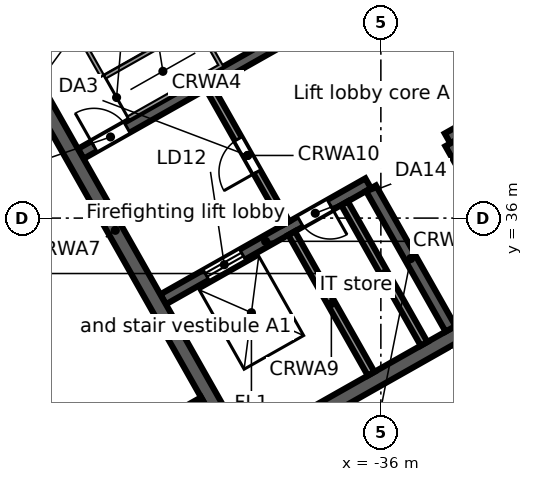
"""IFC4 building model, lengths in metres.
Left out: names, types, materials, properties, quantities, classifications, styles, units other than length and angle.
Written with IfcOpenShell. Run it as: python <this file> out.ifc"""

import sys

from ifc_helpers import new_model, si_unit, direction, frame, frame_2d, origin, place, context, subcontext, project, spatial, rectangle, extrude, element, fill, save


model = new_model("IFC4")
c1 = context("Model", 3, precision=1e-05, world=origin(), true_north=direction((0.0, 1.0)))
c2 = subcontext(c1, "Body", "Model", "MODEL_VIEW")
j1 = project(units=[si_unit("LENGTHUNIT", "METRE"), si_unit("PLANEANGLEUNIT", "RADIAN")], contexts=[c1])
p1 = place(None, origin())
s1 = spatial("IfcSite", under=j1, at=p1, CompositionType="ELEMENT")
p2 = place(p1, origin())
s2 = spatial("IfcBuilding", under=s1, at=p2, CompositionType="ELEMENT")
p3 = place(p2, frame((0.0, 0.0, 281.7)))
s3 = spatial("IfcBuildingStorey", under=s2, at=p3, CompositionType="ELEMENT", Elevation=281.7)
p4 = place(p3, frame((-58.732, 38.771, 0.0), z_axis=(0.0, 0.0, 1.0), x_axis=(0.870355615581, 0.492423702137, 0.0)))
e1 = element("IfcWall", 1, at=p4, inside=s3, PredefinedType="STANDARD", context=c2, shape_type="SweptSolid", body=[
    extrude(rectangle(XDim=64.052, YDim=0.25, at=frame_2d((32.026, 0.0))), origin(), (0.0, 0.0, 1.0), 3.45),
])
p5 = place(p4, frame((61.259, 0.0, 0.8)))
e2 = element("IfcOpeningElement", 2, at=p5, cuts=e1, PredefinedType="OPENING", context=c2, shape_type="SweptSolid", body=[
    extrude(rectangle(XDim=2.4, YDim=2.2, at=frame_2d((1.2, 1.1))), frame((0.0, 0.135, 0.0), z_axis=(0.0, -1.0, 0.0), x_axis=(1.0, 0.0, 0.0)), (0.0, 0.0, 1.0), 0.27),
])
p6 = place(p4, frame((58.216, 0.0, 0.8)))
e3 = element("IfcOpeningElement", 3, at=p6, cuts=e1, PredefinedType="OPENING", context=c2, shape_type="SweptSolid", body=[
    extrude(rectangle(XDim=2.4, YDim=2.2, at=frame_2d((1.2, 1.1))), frame((0.0, 0.135, 0.0), z_axis=(0.0, -1.0, 0.0), x_axis=(1.0, 0.0, 0.0)), (0.0, 0.0, 1.0), 0.27),
])
p7 = place(p4, frame((55.173, 0.0, 0.8)))
e4 = element("IfcOpeningElement", 4, at=p7, cuts=e1, PredefinedType="OPENING", context=c2, shape_type="SweptSolid", body=[
    extrude(rectangle(XDim=2.4, YDim=2.2, at=frame_2d((1.2, 1.1))), frame((0.0, 0.135, 0.0), z_axis=(0.0, -1.0, 0.0), x_axis=(1.0, 0.0, 0.0)), (0.0, 0.0, 1.0), 0.27),
])
p8 = place(p4, frame((52.129, 0.0, 0.8)))
e5 = element("IfcOpeningElement", 5, at=p8, cuts=e1, PredefinedType="OPENING", context=c2, shape_type="SweptSolid", body=[
    extrude(rectangle(XDim=2.4, YDim=2.2, at=frame_2d((1.2, 1.1))), frame((0.0, 0.135, 0.0), z_axis=(0.0, -1.0, 0.0), x_axis=(1.0, 0.0, 0.0)), (0.0, 0.0, 1.0), 0.27),
])
p9 = place(p4, frame((49.086, 0.0, 0.8)))
e6 = element("IfcOpeningElement", 6, at=p9, cuts=e1, PredefinedType="OPENING", context=c2, shape_type="SweptSolid", body=[
    extrude(rectangle(XDim=2.4, YDim=2.2, at=frame_2d((1.2, 1.1))), frame((0.0, 0.135, 0.0), z_axis=(0.0, -1.0, 0.0), x_axis=(1.0, 0.0, 0.0)), (0.0, 0.0, 1.0), 0.27),
])
p10 = place(p4, frame((46.043, 0.0, 0.8)))
e7 = element("IfcOpeningElement", 7, at=p10, cuts=e1, PredefinedType="OPENING", context=c2, shape_type="SweptSolid", body=[
    extrude(rectangle(XDim=2.4, YDim=2.2, at=frame_2d((1.2, 1.1))), frame((0.0, 0.135, 0.0), z_axis=(0.0, -1.0, 0.0), x_axis=(1.0, 0.0, 0.0)), (0.0, 0.0, 1.0), 0.27),
])
p11 = place(p4, frame((43.0, 0.0, 0.8)))
e8 = element("IfcOpeningElement", 8, at=p11, cuts=e1, PredefinedType="OPENING", context=c2, shape_type="SweptSolid", body=[
    extrude(rectangle(XDim=2.4, YDim=2.2, at=frame_2d((1.2, 1.1))), frame((0.0, 0.135, 0.0), z_axis=(0.0, -1.0, 0.0), x_axis=(1.0, 0.0, 0.0)), (0.0, 0.0, 1.0), 0.27),
])
p12 = place(p4, frame((39.956, 0.0, 0.8)))
e9 = element("IfcOpeningElement", 9, at=p12, cuts=e1, PredefinedType="OPENING", context=c2, shape_type="SweptSolid", body=[
    extrude(rectangle(XDim=2.4, YDim=2.2, at=frame_2d((1.2, 1.1))), frame((0.0, 0.135, 0.0), z_axis=(0.0, -1.0, 0.0), x_axis=(1.0, 0.0, 0.0)), (0.0, 0.0, 1.0), 0.27),
])
p13 = place(p4, frame((36.913, 0.0, 0.8)))
e10 = element("IfcOpeningElement", 10, at=p13, cuts=e1, PredefinedType="OPENING", context=c2, shape_type="SweptSolid", body=[
    extrude(rectangle(XDim=2.4, YDim=2.2, at=frame_2d((1.2, 1.1))), frame((0.0, 0.135, 0.0), z_axis=(0.0, -1.0, 0.0), x_axis=(1.0, 0.0, 0.0)), (0.0, 0.0, 1.0), 0.27),
])
p14 = place(p4, frame((33.87, 0.0, 0.8)))
e11 = element("IfcOpeningElement", 11, at=p14, cuts=e1, PredefinedType="OPENING", context=c2, shape_type="SweptSolid", body=[
    extrude(rectangle(XDim=2.4, YDim=2.2, at=frame_2d((1.2, 1.1))), frame((0.0, 0.135, 0.0), z_axis=(0.0, -1.0, 0.0), x_axis=(1.0, 0.0, 0.0)), (0.0, 0.0, 1.0), 0.27),
])
p15 = place(p4, frame((30.826, 0.0, 0.8)))
e12 = element("IfcOpeningElement", 12, at=p15, cuts=e1, PredefinedType="OPENING", context=c2, shape_type="SweptSolid", body=[
    extrude(rectangle(XDim=2.4, YDim=2.2, at=frame_2d((1.2, 1.1))), frame((0.0, 0.135, 0.0), z_axis=(0.0, -1.0, 0.0), x_axis=(1.0, 0.0, 0.0)), (0.0, 0.0, 1.0), 0.27),
])
p16 = place(p4, frame((27.783, 0.0, 0.8)))
e13 = element("IfcOpeningElement", 13, at=p16, cuts=e1, PredefinedType="OPENING", context=c2, shape_type="SweptSolid", body=[
    extrude(rectangle(XDim=2.4, YDim=2.2, at=frame_2d((1.2, 1.1))), frame((0.0, 0.135, 0.0), z_axis=(0.0, -1.0, 0.0), x_axis=(1.0, 0.0, 0.0)), (0.0, 0.0, 1.0), 0.27),
])
p17 = place(p4, frame((24.74, 0.0, 0.8)))
e14 = element("IfcOpeningElement", 14, at=p17, cuts=e1, PredefinedType="OPENING", context=c2, shape_type="SweptSolid", body=[
    extrude(rectangle(XDim=2.4, YDim=2.2, at=frame_2d((1.2, 1.1))), frame((0.0, 0.135, 0.0), z_axis=(0.0, -1.0, 0.0), x_axis=(1.0, 0.0, 0.0)), (0.0, 0.0, 1.0), 0.27),
])
p18 = place(p4, frame((21.696, 0.0, 0.8)))
e15 = element("IfcOpeningElement", 15, at=p18, cuts=e1, PredefinedType="OPENING", context=c2, shape_type="SweptSolid", body=[
    extrude(rectangle(XDim=2.4, YDim=2.2, at=frame_2d((1.2, 1.1))), frame((0.0, 0.135, 0.0), z_axis=(0.0, -1.0, 0.0), x_axis=(1.0, 0.0, 0.0)), (0.0, 0.0, 1.0), 0.27),
])
p19 = place(p4, frame((18.653, 0.0, 0.8)))
e16 = element("IfcOpeningElement", 16, at=p19, cuts=e1, PredefinedType="OPENING", context=c2, shape_type="SweptSolid", body=[
    extrude(rectangle(XDim=2.4, YDim=2.2, at=frame_2d((1.2, 1.1))), frame((0.0, 0.135, 0.0), z_axis=(0.0, -1.0, 0.0), x_axis=(1.0, 0.0, 0.0)), (0.0, 0.0, 1.0), 0.27),
])
p20 = place(p4, frame((15.61, 0.0, 0.8)))
e17 = element("IfcOpeningElement", 17, at=p20, cuts=e1, PredefinedType="OPENING", context=c2, shape_type="SweptSolid", body=[
    extrude(rectangle(XDim=2.4, YDim=2.2, at=frame_2d((1.2, 1.1))), frame((0.0, 0.135, 0.0), z_axis=(0.0, -1.0, 0.0), x_axis=(1.0, 0.0, 0.0)), (0.0, 0.0, 1.0), 0.27),
])
p21 = place(p4, frame((12.567, 0.0, 0.8)))
e18 = element("IfcOpeningElement", 18, at=p21, cuts=e1, PredefinedType="OPENING", context=c2, shape_type="SweptSolid", body=[
    extrude(rectangle(XDim=2.4, YDim=2.2, at=frame_2d((1.2, 1.1))), frame((0.0, 0.135, 0.0), z_axis=(0.0, -1.0, 0.0), x_axis=(1.0, 0.0, 0.0)), (0.0, 0.0, 1.0), 0.27),
])
p22 = place(p4, frame((9.523, 0.0, 0.8)))
e19 = element("IfcOpeningElement", 19, at=p22, cuts=e1, PredefinedType="OPENING", context=c2, shape_type="SweptSolid", body=[
    extrude(rectangle(XDim=2.4, YDim=2.2, at=frame_2d((1.2, 1.1))), frame((0.0, 0.135, 0.0), z_axis=(0.0, -1.0, 0.0), x_axis=(1.0, 0.0, 0.0)), (0.0, 0.0, 1.0), 0.27),
])
p23 = place(p4, frame((6.48, 0.0, 0.8)))
e20 = element("IfcOpeningElement", 20, at=p23, cuts=e1, PredefinedType="OPENING", context=c2, shape_type="SweptSolid", body=[
    extrude(rectangle(XDim=2.4, YDim=2.2, at=frame_2d((1.2, 1.1))), frame((0.0, 0.135, 0.0), z_axis=(0.0, -1.0, 0.0), x_axis=(1.0, 0.0, 0.0)), (0.0, 0.0, 1.0), 0.27),
])
p24 = place(p4, frame((3.437, 0.0, 0.8)))
e21 = element("IfcOpeningElement", 21, at=p24, cuts=e1, PredefinedType="OPENING", context=c2, shape_type="SweptSolid", body=[
    extrude(rectangle(XDim=2.4, YDim=2.2, at=frame_2d((1.2, 1.1))), frame((0.0, 0.135, 0.0), z_axis=(0.0, -1.0, 0.0), x_axis=(1.0, 0.0, 0.0)), (0.0, 0.0, 1.0), 0.27),
])
p25 = place(p4, frame((0.393, 0.0, 0.8)))
e22 = element("IfcOpeningElement", 22, at=p25, cuts=e1, PredefinedType="OPENING", context=c2, shape_type="SweptSolid", body=[
    extrude(rectangle(XDim=2.4, YDim=2.2, at=frame_2d((1.2, 1.1))), frame((0.0, 0.135, 0.0), z_axis=(0.0, -1.0, 0.0), x_axis=(1.0, 0.0, 0.0)), (0.0, 0.0, 1.0), 0.27),
])
p26 = place(p3, frame((-44.115, 26.507, 0.0), z_axis=(0.0, 0.0, 1.0), x_axis=(-0.857166583633, 0.515039268311, 0.0)))
e23 = element("IfcWall", 23, at=p26, inside=s3, PredefinedType="STANDARD", context=c2, shape_type="SweptSolid", body=[
    extrude(rectangle(XDim=17.106, YDim=0.25, at=frame_2d((8.553, 0.0))), origin(), (0.0, 0.0, 1.0), 3.45),
])
p27 = place(p26, frame((14.417, 0.0, 0.8)))
e24 = element("IfcOpeningElement", 24, at=p27, cuts=e23, PredefinedType="OPENING", context=c2, shape_type="SweptSolid", body=[
    extrude(rectangle(XDim=2.4, YDim=2.2, at=frame_2d((1.2, 1.1))), frame((0.0, 0.135, 0.0), z_axis=(0.0, -1.0, 0.0), x_axis=(1.0, 0.0, 0.0)), (0.0, 0.0, 1.0), 0.27),
])
p28 = place(p26, frame((11.584, 0.0, 0.8)))
e25 = element("IfcOpeningElement", 25, at=p28, cuts=e23, PredefinedType="OPENING", context=c2, shape_type="SweptSolid", body=[
    extrude(rectangle(XDim=2.4, YDim=2.2, at=frame_2d((1.2, 1.1))), frame((0.0, 0.135, 0.0), z_axis=(0.0, -1.0, 0.0), x_axis=(1.0, 0.0, 0.0)), (0.0, 0.0, 1.0), 0.27),
])
p29 = place(p26, frame((8.75, 0.0, 0.8)))
e26 = element("IfcOpeningElement", 26, at=p29, cuts=e23, PredefinedType="OPENING", context=c2, shape_type="SweptSolid", body=[
    extrude(rectangle(XDim=2.4, YDim=2.2, at=frame_2d((1.2, 1.1))), frame((0.0, 0.135, 0.0), z_axis=(0.0, -1.0, 0.0), x_axis=(1.0, 0.0, 0.0)), (0.0, 0.0, 1.0), 0.27),
])
p30 = place(p26, frame((5.917, 0.0, 0.8)))
e27 = element("IfcOpeningElement", 27, at=p30, cuts=e23, PredefinedType="OPENING", context=c2, shape_type="SweptSolid", body=[
    extrude(rectangle(XDim=2.4, YDim=2.2, at=frame_2d((1.2, 1.1))), frame((0.0, 0.135, 0.0), z_axis=(0.0, -1.0, 0.0), x_axis=(1.0, 0.0, 0.0)), (0.0, 0.0, 1.0), 0.27),
])
p31 = place(p26, frame((3.084, 0.0, 0.8)))
e28 = element("IfcOpeningElement", 28, at=p31, cuts=e23, PredefinedType="OPENING", context=c2, shape_type="SweptSolid", body=[
    extrude(rectangle(XDim=2.4, YDim=2.2, at=frame_2d((1.2, 1.1))), frame((0.0, 0.135, 0.0), z_axis=(0.0, -1.0, 0.0), x_axis=(1.0, 0.0, 0.0)), (0.0, 0.0, 1.0), 0.27),
])
p32 = place(p26, frame((0.25, 0.0, 0.8)))
e29 = element("IfcOpeningElement", 29, at=p32, cuts=e23, PredefinedType="OPENING", context=c2, shape_type="SweptSolid", body=[
    extrude(rectangle(XDim=2.4, YDim=2.2, at=frame_2d((1.2, 1.1))), frame((0.0, 0.135, 0.0), z_axis=(0.0, -1.0, 0.0), x_axis=(1.0, 0.0, 0.0)), (0.0, 0.0, 1.0), 0.27),
])
p33 = place(p3, frame((-3.017, 46.293, 0.0), z_axis=(0.0, 0.0, 1.0), x_axis=(-0.870355474887, -0.492423950812, 0.0)))
e30 = element("IfcWall", 30, at=p33, inside=s3, PredefinedType="STANDARD", context=c2, shape_type="SweptSolid", body=[
    extrude(rectangle(XDim=40.34, YDim=0.25, at=frame_2d((20.17, 0.0))), origin(), (0.0, 0.0, 1.0), 3.45),
])
p34 = place(p33, frame((37.428, 0.0, 0.8)))
e31 = element("IfcOpeningElement", 31, at=p34, cuts=e30, PredefinedType="OPENING", context=c2, shape_type="SweptSolid", body=[
    extrude(rectangle(XDim=2.4, YDim=2.2, at=frame_2d((1.2, 1.1))), frame((0.0, 0.135, 0.0), z_axis=(0.0, -1.0, 0.0), x_axis=(1.0, 0.0, 0.0)), (0.0, 0.0, 1.0), 0.27),
])
p35 = place(p33, frame((34.372, 0.0, 0.0)))
e32 = element("IfcOpeningElement", 32, at=p35, cuts=e30, PredefinedType="OPENING", context=c2, shape_type="SweptSolid", body=[
    extrude(rectangle(XDim=1.8, YDim=2.4, at=frame_2d((0.9, 1.2))), frame((0.0, 0.135, 0.0), z_axis=(0.0, -1.0, 0.0), x_axis=(1.0, 0.0, 0.0)), (0.0, 0.0, 1.0), 0.27),
])
p36 = place(p33, frame((30.716, 0.0, 0.8)))
e33 = element("IfcOpeningElement", 33, at=p36, cuts=e30, PredefinedType="OPENING", context=c2, shape_type="SweptSolid", body=[
    extrude(rectangle(XDim=2.4, YDim=2.2, at=frame_2d((1.2, 1.1))), frame((0.0, 0.135, 0.0), z_axis=(0.0, -1.0, 0.0), x_axis=(1.0, 0.0, 0.0)), (0.0, 0.0, 1.0), 0.27),
])
p37 = place(p33, frame((27.36, 0.0, 0.8)))
e34 = element("IfcOpeningElement", 34, at=p37, cuts=e30, PredefinedType="OPENING", context=c2, shape_type="SweptSolid", body=[
    extrude(rectangle(XDim=2.4, YDim=2.2, at=frame_2d((1.2, 1.1))), frame((0.0, 0.135, 0.0), z_axis=(0.0, -1.0, 0.0), x_axis=(1.0, 0.0, 0.0)), (0.0, 0.0, 1.0), 0.27),
])
p38 = place(p33, frame((24.304, 0.0, 0.0)))
e35 = element("IfcOpeningElement", 35, at=p38, cuts=e30, PredefinedType="OPENING", context=c2, shape_type="SweptSolid", body=[
    extrude(rectangle(XDim=1.8, YDim=2.4, at=frame_2d((0.9, 1.2))), frame((0.0, 0.135, 0.0), z_axis=(0.0, -1.0, 0.0), x_axis=(1.0, 0.0, 0.0)), (0.0, 0.0, 1.0), 0.27),
])
p39 = place(p33, frame((20.648, 0.0, 0.8)))
e36 = element("IfcOpeningElement", 36, at=p39, cuts=e30, PredefinedType="OPENING", context=c2, shape_type="SweptSolid", body=[
    extrude(rectangle(XDim=2.4, YDim=2.2, at=frame_2d((1.2, 1.1))), frame((0.0, 0.135, 0.0), z_axis=(0.0, -1.0, 0.0), x_axis=(1.0, 0.0, 0.0)), (0.0, 0.0, 1.0), 0.27),
])
p40 = place(p33, frame((17.292, 0.0, 0.8)))
e37 = element("IfcOpeningElement", 37, at=p40, cuts=e30, PredefinedType="OPENING", context=c2, shape_type="SweptSolid", body=[
    extrude(rectangle(XDim=2.4, YDim=2.2, at=frame_2d((1.2, 1.1))), frame((0.0, 0.135, 0.0), z_axis=(0.0, -1.0, 0.0), x_axis=(1.0, 0.0, 0.0)), (0.0, 0.0, 1.0), 0.27),
])
p41 = place(p33, frame((14.236, 0.0, 0.0)))
e38 = element("IfcOpeningElement", 38, at=p41, cuts=e30, PredefinedType="OPENING", context=c2, shape_type="SweptSolid", body=[
    extrude(rectangle(XDim=1.8, YDim=2.4, at=frame_2d((0.9, 1.2))), frame((0.0, 0.135, 0.0), z_axis=(0.0, -1.0, 0.0), x_axis=(1.0, 0.0, 0.0)), (0.0, 0.0, 1.0), 0.27),
])
p42 = place(p33, frame((10.58, 0.0, 0.8)))
e39 = element("IfcOpeningElement", 39, at=p42, cuts=e30, PredefinedType="OPENING", context=c2, shape_type="SweptSolid", body=[
    extrude(rectangle(XDim=2.4, YDim=2.2, at=frame_2d((1.2, 1.1))), frame((0.0, 0.135, 0.0), z_axis=(0.0, -1.0, 0.0), x_axis=(1.0, 0.0, 0.0)), (0.0, 0.0, 1.0), 0.27),
])
p43 = place(p33, frame((7.224, 0.0, 0.8)))
e40 = element("IfcOpeningElement", 40, at=p43, cuts=e30, PredefinedType="OPENING", context=c2, shape_type="SweptSolid", body=[
    extrude(rectangle(XDim=2.4, YDim=2.2, at=frame_2d((1.2, 1.1))), frame((0.0, 0.135, 0.0), z_axis=(0.0, -1.0, 0.0), x_axis=(1.0, 0.0, 0.0)), (0.0, 0.0, 1.0), 0.27),
])
p44 = place(p33, frame((4.168, 0.0, 0.0)))
e41 = element("IfcOpeningElement", 41, at=p44, cuts=e30, PredefinedType="OPENING", context=c2, shape_type="SweptSolid", body=[
    extrude(rectangle(XDim=1.8, YDim=2.4, at=frame_2d((0.9, 1.2))), frame((0.0, 0.135, 0.0), z_axis=(0.0, -1.0, 0.0), x_axis=(1.0, 0.0, 0.0)), (0.0, 0.0, 1.0), 0.27),
])
p45 = place(p33, frame((0.512, 0.0, 0.8)))
e42 = element("IfcOpeningElement", 42, at=p45, cuts=e30, PredefinedType="OPENING", context=c2, shape_type="SweptSolid", body=[
    extrude(rectangle(XDim=2.4, YDim=2.2, at=frame_2d((1.2, 1.1))), frame((0.0, 0.135, 0.0), z_axis=(0.0, -1.0, 0.0), x_axis=(1.0, 0.0, 0.0)), (0.0, 0.0, 1.0), 0.27),
])
p46 = place(p3, frame((-39.813, 29.662, 0.0), z_axis=(0.0, 0.0, 1.0), x_axis=(0.870350116061, 0.492433422375, 0.0)))
e43 = element("IfcWall", 43, at=p46, inside=s3, PredefinedType="SOLIDWALL", context=c2, shape_type="SweptSolid", body=[
    extrude(rectangle(XDim=17.0, YDim=0.4, at=frame_2d((8.5, 0.0))), origin(), (0.0, 0.0, 1.0), 3.45),
])
p47 = place(p46, frame((7.2, 0.0, 0.0)))
e44 = element("IfcOpeningElement", 44, at=p47, cuts=e43, PredefinedType="OPENING", context=c2, shape_type="SweptSolid", body=[
    extrude(rectangle(XDim=1.2, YDim=2.1, at=frame_2d((0.6, 1.05))), frame((0.0, 0.21, 0.0), z_axis=(0.0, -1.0, 0.0), x_axis=(1.0, 0.0, 0.0)), (0.0, 0.0, 1.0), 0.42),
])
p48 = place(p3, frame((-41.73, 33.863, 0.0), z_axis=(0.0, 0.0, 1.0), x_axis=(0.870350800578, 0.492432212525, 0.0)))
e45 = element("IfcWall", 45, at=p48, inside=s3, PredefinedType="SOLIDWALL", context=c2, shape_type="SweptSolid", body=[
    extrude(rectangle(XDim=6.2, YDim=0.3, at=frame_2d((3.1, 0.0))), origin(), (0.0, 0.0, 1.0), 3.45),
])
p49 = place(p48, frame((1.3, 0.0, 0.0)))
e46 = element("IfcOpeningElement", 46, at=p49, cuts=e45, PredefinedType="OPENING", context=c2, shape_type="SweptSolid", body=[
    extrude(rectangle(XDim=1.1, YDim=2.1, at=frame_2d((0.55, 1.05))), frame((0.0, 0.16, 0.0), z_axis=(0.0, -1.0, 0.0), x_axis=(1.0, 0.0, 0.0)), (0.0, 0.0, 1.0), 0.32),
])
p50 = place(p48, frame((4.15, 0.0, 0.0)))
e47 = element("IfcOpeningElement", 47, at=p50, cuts=e45, PredefinedType="OPENING", context=c2, shape_type="SweptSolid", body=[
    extrude(rectangle(XDim=0.9, YDim=2.1, at=frame_2d((0.45, 1.05))), frame((0.0, 0.16, 0.0), z_axis=(0.0, -1.0, 0.0), x_axis=(1.0, 0.0, 0.0)), (0.0, 0.0, 1.0), 0.32),
])
p51 = place(p3, frame((-34.245, 38.097, 0.0), z_axis=(0.0, 0.0, 1.0), x_axis=(0.870356351998, 0.492422400523, 0.0)))
e48 = element("IfcWall", 48, at=p51, inside=s3, PredefinedType="SOLIDWALL", context=c2, shape_type="SweptSolid", body=[
    extrude(rectangle(XDim=7.6, YDim=0.3, at=frame_2d((3.8, 0.0))), origin(), (0.0, 0.0, 1.0), 3.45),
])
p52 = place(p51, frame((6.2, 0.0, 0.0)))
e49 = element("IfcOpeningElement", 49, at=p52, cuts=e48, PredefinedType="OPENING", context=c2, shape_type="SweptSolid", body=[
    extrude(rectangle(XDim=1.0, YDim=2.1, at=frame_2d((0.5, 1.05))), frame((0.0, 0.16, 0.0), z_axis=(0.0, -1.0, 0.0), x_axis=(1.0, 0.0, 0.0)), (0.0, 0.0, 1.0), 0.32),
])
p53 = place(p3, frame((-43.897, 37.692, 0.0), z_axis=(0.0, 0.0, 1.0), x_axis=(0.870356351998, 0.492422400523, 0.0)))
e50 = element("IfcWall", 50, at=p53, inside=s3, PredefinedType="SOLIDWALL", context=c2, shape_type="SweptSolid", body=[
    extrude(rectangle(XDim=7.6, YDim=0.3, at=frame_2d((3.8, 0.0))), origin(), (0.0, 0.0, 1.0), 3.45),
])
p54 = place(p53, frame((0.4, 0.0, 0.0)))
e51 = element("IfcOpeningElement", 51, at=p54, cuts=e50, PredefinedType="OPENING", context=c2, shape_type="SweptSolid", body=[
    extrude(rectangle(XDim=1.0, YDim=2.1, at=frame_2d((0.5, 1.05))), frame((0.0, 0.16, 0.0), z_axis=(0.0, -1.0, 0.0), x_axis=(1.0, 0.0, 0.0)), (0.0, 0.0, 1.0), 0.32),
])
p55 = place(p3, frame((-46.238, 41.423, 0.0), z_axis=(0.0, 0.0, 1.0), x_axis=(0.492421663121, -0.870356769198, 0.0)))
e52 = element("IfcWall", 52, at=p55, inside=s3, PredefinedType="SOLIDWALL", context=c2, shape_type="SweptSolid", body=[
    extrude(rectangle(XDim=13.2, YDim=0.4, at=frame_2d((6.6, 0.0))), origin(), (0.0, 0.0, 1.0), 3.45),
])
p56 = place(p3, frame((-38.349, 35.603, 0.0), z_axis=(0.0, 0.0, 1.0), x_axis=(0.492397924348, -0.870370199454, 0.0)))
e53 = element("IfcWall", 53, at=p56, inside=s3, PredefinedType="SOLIDWALL", context=c2, shape_type="SweptSolid", body=[
    extrude(rectangle(XDim=4.25, YDim=0.2, at=frame_2d((2.125, 0.0))), origin(), (0.0, 0.0, 1.0), 3.45),
])
p57 = place(p3, frame((-40.516, 39.433, 0.0), z_axis=(0.0, 0.0, 1.0), x_axis=(0.492453559952, -0.87033872216, 0.0)))
e54 = element("IfcWall", 54, at=p57, inside=s3, PredefinedType="PARTITIONING", context=c2, shape_type="SweptSolid", body=[
    extrude(rectangle(XDim=4.1, YDim=0.2, at=frame_2d((2.05, 0.0))), origin(), (0.0, 0.0, 1.0), 3.45),
])
p58 = place(p57, frame((1.55, 0.0, 0.0)))
e55 = element("IfcOpeningElement", 55, at=p58, cuts=e54, PredefinedType="OPENING", context=c2, shape_type="SweptSolid", body=[
    extrude(rectangle(XDim=1.0, YDim=2.1, at=frame_2d((0.5, 1.05))), frame((0.0, 0.11, 0.0), z_axis=(0.0, -1.0, 0.0), x_axis=(1.0, 0.0, 0.0)), (0.0, 0.0, 1.0), 0.22),
])
p59 = place(p3, frame((-36.956, 36.391, 0.0), z_axis=(0.0, 0.0, 1.0), x_axis=(0.492397924348, -0.870370199454, 0.0)))
e56 = element("IfcWall", 56, at=p59, inside=s3, PredefinedType="SOLIDWALL", context=c2, shape_type="SweptSolid", body=[
    extrude(rectangle(XDim=4.25, YDim=0.2, at=frame_2d((2.125, 0.0))), origin(), (0.0, 0.0, 1.0), 3.45),
])
for number, where, z_axis, x_axis in (
    (57, (-36.26, 36.785, 0.0), (0.0, 0.0, 1.0), (0.492, -0.87, 0.0)),
    (58, (-34.171, 37.967, 0.0), (0.0, 0.0, 1.0), (0.492, -0.87, 0.0)),
):
    element("IfcWall", number, at=place(p3, frame(where, z_axis=z_axis, x_axis=x_axis)), inside=s3, PredefinedType="SOLIDWALL", context=c2, shape_type="SweptSolid", body=[
        extrude(rectangle(XDim=4.25, YDim=0.3, at=frame_2d((2.125, 0.0))), origin(), (0.0, 0.0, 1.0), 3.45),
    ])
p60 = place(p3, frame((-46.381, 28.015, 0.0), z_axis=(0.0, 0.0, 1.0), x_axis=(0.870364232693, 0.492408471139, 0.0)))
e59 = element("IfcWall", 59, at=p60, inside=s3, PredefinedType="PARTITIONING", context=c2, shape_type="SweptSolid", body=[
    extrude(rectangle(XDim=6.527, YDim=0.125, at=frame_2d((3.264, 0.0))), origin(), (0.0, 0.0, 1.0), 2.73),
])
p61 = place(p60, frame((2.7, 0.0, 0.0)))
e60 = element("IfcOpeningElement", 60, at=p61, cuts=e59, PredefinedType="OPENING", context=c2, shape_type="SweptSolid", body=[
    extrude(rectangle(XDim=0.9, YDim=2.1, at=frame_2d((0.45, 1.05))), frame((0.0, 0.073, 0.0), z_axis=(0.0, -1.0, 0.0), x_axis=(1.0, 0.0, 0.0)), (0.0, 0.0, 1.0), 0.145),
])
p62 = place(p49, origin())
e61 = element("IfcDoor", 61, at=p62, inside=s3, OperationType="DOUBLE_DOOR_SLIDING", PredefinedType="DOOR", context=c2, shape_type="SweptSolid", body=[
    extrude(rectangle(XDim=1.1, YDim=2.1, at=frame_2d((0.55, 1.05))), frame((0.0, 0.025, 0.0), z_axis=(0.0, -1.0, 0.0), x_axis=(1.0, 0.0, 0.0)), (0.0, 0.0, 1.0), 0.05),
])
fill(e46, e61)
p63 = place(p54, origin())
e62 = element("IfcDoor", 62, at=p63, inside=s3, OperationType="SINGLE_SWING_LEFT", PredefinedType="DOOR", context=c2, shape_type="SweptSolid", body=[
    extrude(rectangle(XDim=1.0, YDim=2.1, at=frame_2d((0.5, 1.05))), frame((0.0, 0.025, 0.0), z_axis=(0.0, -1.0, 0.0), x_axis=(1.0, 0.0, 0.0)), (0.0, 0.0, 1.0), 0.05),
])
fill(e51, e62)
p64 = place(p58, frame((1.0, 0.0, 0.0), z_axis=(0.0, 0.0, 1.0), x_axis=(-1.0, 0.0, 0.0)))
e63 = element("IfcDoor", 63, at=p64, inside=s3, OperationType="SINGLE_SWING_LEFT", PredefinedType="DOOR", context=c2, shape_type="SweptSolid", body=[
    extrude(rectangle(XDim=1.0, YDim=2.1, at=frame_2d((0.5, 1.05))), frame((0.0, 0.025, 0.0), z_axis=(0.0, -1.0, 0.0), x_axis=(1.0, 0.0, 0.0)), (0.0, 0.0, 1.0), 0.05),
])
fill(e55, e63)
p65 = place(p50, frame((0.9, 0.0, 0.0), z_axis=(0.0, 0.0, 1.0), x_axis=(-1.0, 0.0, 0.0)))
e64 = element("IfcDoor", 64, at=p65, inside=s3, OperationType="SINGLE_SWING_LEFT", PredefinedType="DOOR", context=c2, shape_type="SweptSolid", body=[
    extrude(rectangle(XDim=0.9, YDim=2.1, at=frame_2d((0.45, 1.05))), frame((0.0, 0.025, 0.0), z_axis=(0.0, -1.0, 0.0), x_axis=(1.0, 0.0, 0.0)), (0.0, 0.0, 1.0), 0.05),
])
fill(e47, e64)
save(model, sys.argv[1])
